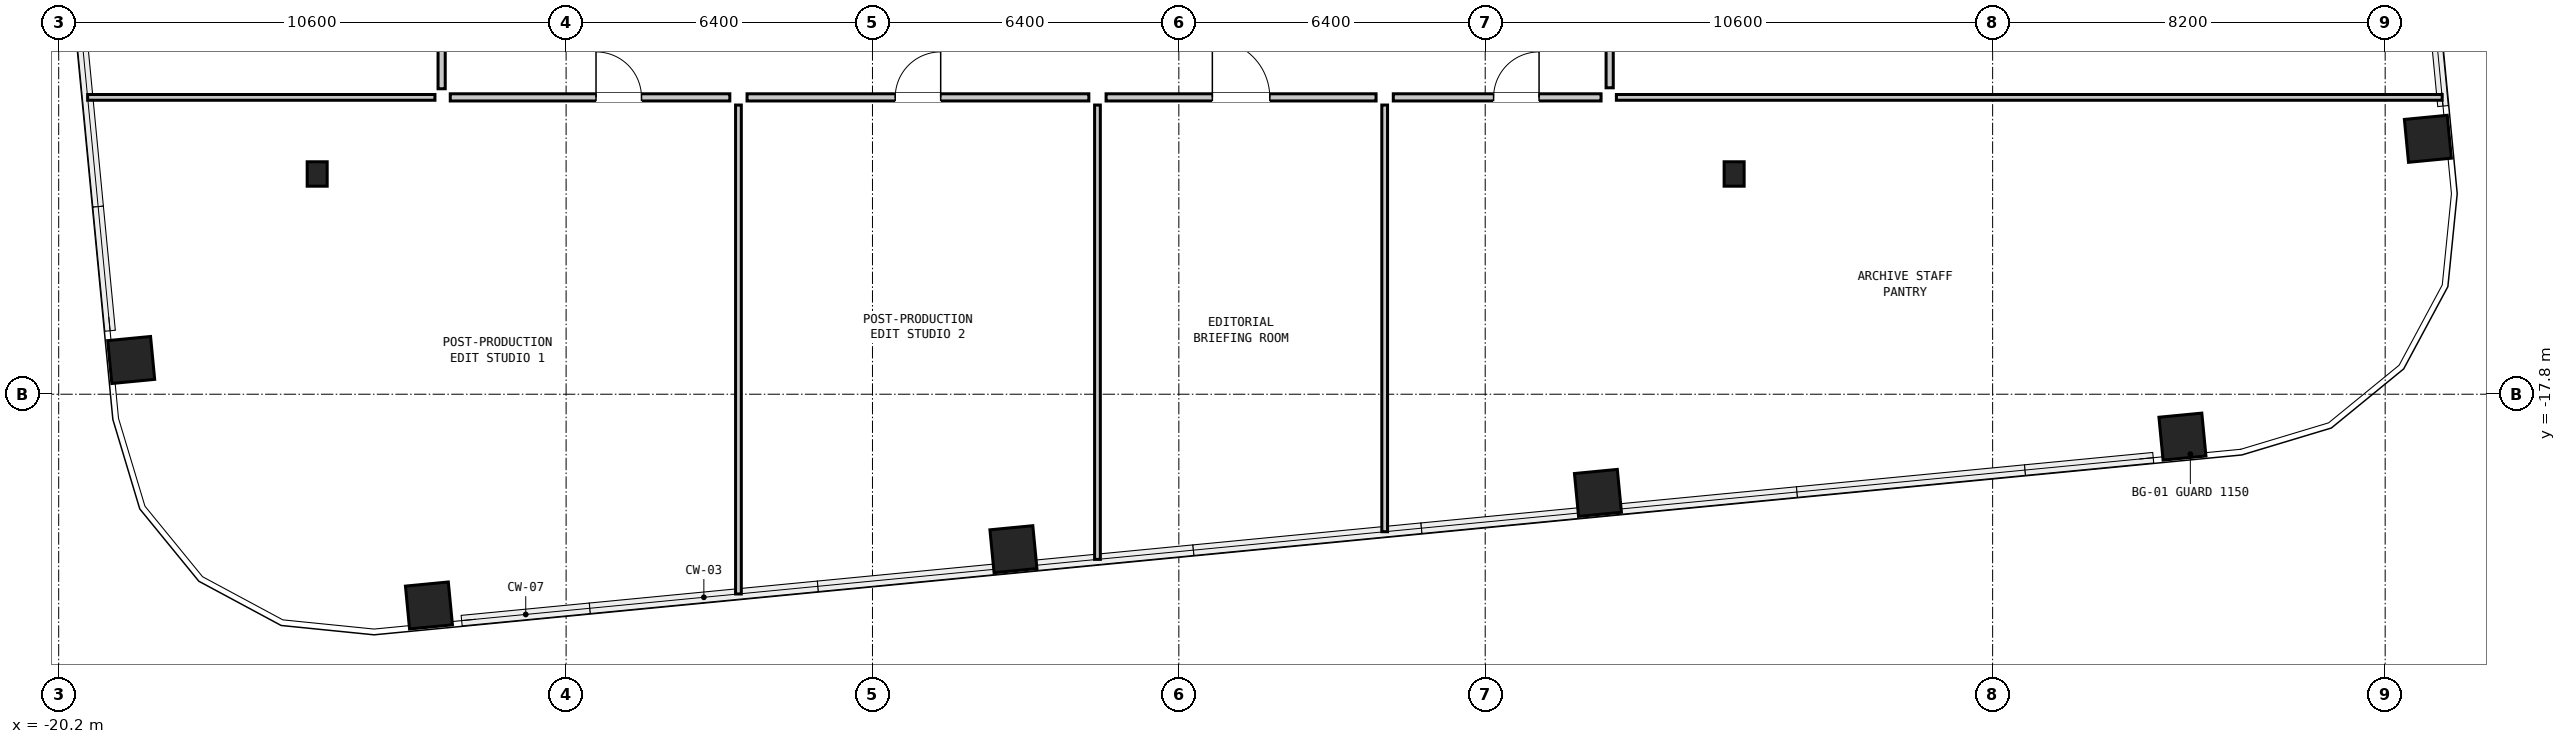
"""IFC4 building model, lengths in metres.
Left out: names, types, materials, properties, quantities, classifications, styles, units other than length and angle.
Written with IfcOpenShell. Run it as: python <this file> out.ifc"""

import sys

from ifc_helpers import new_model, si_unit, direction, frame, frame_2d, origin, origin_2d, place, context, subcontext, project, spatial, rectangle, hollow_rectangle, i_section, extrude, element, fill, save


model = new_model("IFC4")
c1 = context("Model", 3, precision=1e-05, world=origin(), true_north=direction((0.0, 1.0)))
c2 = subcontext(c1, "Body", "Model", "MODEL_VIEW")
j1 = project(units=[si_unit("LENGTHUNIT", "METRE"), si_unit("PLANEANGLEUNIT", "RADIAN")], contexts=[c1])
p1 = place(None, origin())
s1 = spatial("IfcSite", under=j1, at=p1, CompositionType="ELEMENT")
p2 = place(p1, origin())
s2 = spatial("IfcBuilding", under=s1, at=p2, CompositionType="ELEMENT")
p3 = place(p2, frame((0.0, 0.0, 87.75)))
s3 = spatial("IfcBuildingStorey", under=s2, at=p3, CompositionType="ELEMENT", Elevation=87.75)
for number, where, z_axis, x_axis in (
    (1, (-12.465, -22.213, 0.0), (0.0, 0.0, 1.0), (0.995, 0.096, 0.0)),
    (2, (-0.255, -21.037, 0.0), (0.0, 0.0, 1.0), (0.995, 0.096, 0.0)),
    (3, (11.955, -19.861, 0.0), (0.0, 0.0, 1.0), (0.995, 0.096, 0.0)),
    (4, (24.165, -18.686, 0.0), (0.0, 0.0, 1.0), (0.995, 0.096, 0.0)),
    (5, (29.292, -12.465, 0.0), (0.0, 0.0, 1.0), (-0.096, 0.995, 0.0)),
    (6, (-18.686, -17.085, 0.0), (0.0, 0.0, 1.0), (-0.096, 0.995, 0.0)),
):
    element("IfcColumn", number, at=place(p3, frame(where, z_axis=z_axis, x_axis=x_axis)), inside=s3, PredefinedType="COLUMN", context=c2, shape_type="SweptSolid", body=[
        extrude(hollow_rectangle(XDim=0.9, YDim=0.9, WallThickness=0.055, at=origin_2d()), origin(), (0.0, 0.0, 1.0), 3.05),
    ])
for number, where, z_axis, x_axis in (
    (7, (-14.8, -13.2, 0.0), (0.0, 0.0, 1.0), (1.0, 0.0, 0.0)),
    (8, (14.8, -13.2, 0.0), (0.0, 0.0, 1.0), (1.0, 0.0, 0.0)),
):
    element("IfcColumn", number, at=place(p3, frame(where, z_axis=z_axis, x_axis=x_axis)), inside=s3, PredefinedType="COLUMN", context=c2, shape_type="SweptSolid", body=[
        extrude(i_section(OverallWidth=0.418, OverallDepth=0.51, WebThickness=0.042, FlangeThickness=0.068, at=origin_2d()), origin(), (0.0, 0.0, 1.0), 3.05),
    ])
p4 = place(p3, frame((-19.595, -11.6, 0.0), z_axis=(0.0, 0.0, 1.0), x_axis=(1.0, 0.0, 0.0)))
e9 = element("IfcWall", 9, at=p4, inside=s3, PredefinedType="PARTITIONING", context=c2, shape_type="SweptSolid", body=[
    extrude(rectangle(XDim=7.255, YDim=0.12, at=frame_2d((3.628, 0.0))), origin(), (0.0, 0.0, 1.0), 2.274),
])
p5 = place(p3, frame((12.34, -11.6, 0.0), z_axis=(0.0, 0.0, 1.0), x_axis=(1.0, 0.0, 0.0)))
e10 = element("IfcWall", 10, at=p5, inside=s3, PredefinedType="PARTITIONING", context=c2, shape_type="SweptSolid", body=[
    extrude(rectangle(XDim=17.251, YDim=0.12, at=frame_2d((8.625, 0.0))), origin(), (0.0, 0.0, 1.0), 2.274),
])
p6 = place(p3, frame((-6.0, -21.972, 0.0), z_axis=(0.0, 0.0, 1.0), x_axis=(0.0, 1.0, 0.0)))
e11 = element("IfcWall", 11, at=p6, inside=s3, PredefinedType="PARTITIONING", context=c2, shape_type="SweptSolid", body=[
    extrude(rectangle(XDim=10.212, YDim=0.12, at=frame_2d((5.106, 0.0))), origin(), (0.0, 0.0, 1.0), 2.274),
])
p7 = place(p3, frame((1.5, -21.25, 0.0), z_axis=(0.0, 0.0, 1.0), x_axis=(0.0, 1.0, 0.0)))
e12 = element("IfcWall", 12, at=p7, inside=s3, PredefinedType="PARTITIONING", context=c2, shape_type="SweptSolid", body=[
    extrude(rectangle(XDim=9.49, YDim=0.12, at=frame_2d((4.745, 0.0))), origin(), (0.0, 0.0, 1.0), 2.83),
])
p8 = place(p3, frame((7.5, -20.672, 0.0), z_axis=(0.0, 0.0, 1.0), x_axis=(0.0, 1.0, 0.0)))
e13 = element("IfcWall", 13, at=p8, inside=s3, PredefinedType="PARTITIONING", context=c2, shape_type="SweptSolid", body=[
    extrude(rectangle(XDim=8.912, YDim=0.12, at=frame_2d((4.456, 0.0))), origin(), (0.0, 0.0, 1.0), 2.83),
])
p9 = place(p3, frame((-12.02, -11.6, 0.0), z_axis=(0.0, 0.0, 1.0), x_axis=(1.0, 0.0, 0.0)))
e14 = element("IfcWall", 14, at=p9, inside=s3, PredefinedType="PARTITIONING", context=c2, shape_type="SweptSolid", body=[
    extrude(rectangle(XDim=5.84, YDim=0.15, at=frame_2d((2.92, 0.0))), origin(), (0.0, 0.0, 1.0), 2.274),
])
p10 = place(p9, frame((3.045, 0.0, 0.0)))
e15 = element("IfcOpeningElement", 15, at=p10, cuts=e14, PredefinedType="OPENING", context=c2, shape_type="SweptSolid", body=[
    extrude(rectangle(XDim=0.95, YDim=2.1, at=frame_2d((0.475, 1.05))), frame((0.0, 0.087, 0.0), z_axis=(0.0, -1.0, 0.0), x_axis=(1.0, 0.0, 0.0)), (0.0, 0.0, 1.0), 0.174),
])
p11 = place(p3, frame((-5.82, -11.6, 0.0), z_axis=(0.0, 0.0, 1.0), x_axis=(1.0, 0.0, 0.0)))
e16 = element("IfcWall", 16, at=p11, inside=s3, PredefinedType="PARTITIONING", context=c2, shape_type="SweptSolid", body=[
    extrude(rectangle(XDim=7.14, YDim=0.15, at=frame_2d((3.57, 0.0))), origin(), (0.0, 0.0, 1.0), 2.83),
])
p12 = place(p11, frame((3.095, 0.0, 0.0)))
e17 = element("IfcOpeningElement", 17, at=p12, cuts=e16, PredefinedType="OPENING", context=c2, shape_type="SweptSolid", body=[
    extrude(rectangle(XDim=0.95, YDim=2.1, at=frame_2d((0.475, 1.05))), frame((0.0, 0.087, 0.0), z_axis=(0.0, -1.0, 0.0), x_axis=(1.0, 0.0, 0.0)), (0.0, 0.0, 1.0), 0.174),
])
p13 = place(p3, frame((1.68, -11.6, 0.0), z_axis=(0.0, 0.0, 1.0), x_axis=(1.0, 0.0, 0.0)))
e18 = element("IfcWall", 18, at=p13, inside=s3, PredefinedType="PARTITIONING", context=c2, shape_type="SweptSolid", body=[
    extrude(rectangle(XDim=5.64, YDim=0.15, at=frame_2d((2.82, 0.0))), origin(), (0.0, 0.0, 1.0), 2.83),
])
p14 = place(p13, frame((2.22, 0.0, 0.0)))
e19 = element("IfcOpeningElement", 19, at=p14, cuts=e18, PredefinedType="OPENING", context=c2, shape_type="SweptSolid", body=[
    extrude(rectangle(XDim=1.2, YDim=2.1, at=frame_2d((0.6, 1.05))), frame((0.0, 0.087, 0.0), z_axis=(0.0, -1.0, 0.0), x_axis=(1.0, 0.0, 0.0)), (0.0, 0.0, 1.0), 0.174),
])
p15 = place(p3, frame((7.68, -11.6, 0.0), z_axis=(0.0, 0.0, 1.0), x_axis=(1.0, 0.0, 0.0)))
e20 = element("IfcWall", 20, at=p15, inside=s3, PredefinedType="PARTITIONING", context=c2, shape_type="SweptSolid", body=[
    extrude(rectangle(XDim=4.34, YDim=0.15, at=frame_2d((2.17, 0.0))), origin(), (0.0, 0.0, 1.0), 2.274),
])
p16 = place(p15, frame((2.095, 0.0, 0.0)))
e21 = element("IfcOpeningElement", 21, at=p16, cuts=e20, PredefinedType="OPENING", context=c2, shape_type="SweptSolid", body=[
    extrude(rectangle(XDim=0.95, YDim=2.1, at=frame_2d((0.475, 1.05))), frame((0.0, 0.087, 0.0), z_axis=(0.0, -1.0, 0.0), x_axis=(1.0, 0.0, 0.0)), (0.0, 0.0, 1.0), 0.174),
])
p17 = place(p3, frame((-12.2, -11.42, 0.0), z_axis=(0.0, 0.0, 1.0), x_axis=(0.0, 1.0, 0.0)))
e22 = element("IfcWall", 22, at=p17, inside=s3, PredefinedType="PARTITIONING", context=c2, shape_type="SweptSolid", body=[
    extrude(rectangle(XDim=8.24, YDim=0.15, at=frame_2d((4.12, 0.0))), origin(), (0.0, 0.0, 1.0), 2.83),
])
p18 = place(p17, frame((3.645, 0.0, 0.0)))
e23 = element("IfcOpeningElement", 23, at=p18, cuts=e22, PredefinedType="OPENING", context=c2, shape_type="SweptSolid", body=[
    extrude(rectangle(XDim=0.95, YDim=2.1, at=frame_2d((0.475, 1.05))), frame((0.0, 0.087, 0.0), z_axis=(0.0, -1.0, 0.0), x_axis=(1.0, 0.0, 0.0)), (0.0, 0.0, 1.0), 0.174),
])
p19 = place(p3, frame((12.2, -11.4, 0.0), z_axis=(0.0, 0.0, 1.0), x_axis=(0.0, 1.0, 0.0)))
e24 = element("IfcWall", 24, at=p19, inside=s3, PredefinedType="PARTITIONING", context=c2, shape_type="SweptSolid", body=[
    extrude(rectangle(XDim=8.84, YDim=0.15, at=frame_2d((4.42, 0.0))), origin(), (0.0, 0.0, 1.0), 2.83),
])
p20 = place(p19, frame((3.945, 0.0, 0.0)))
e25 = element("IfcOpeningElement", 25, at=p20, cuts=e24, PredefinedType="OPENING", context=c2, shape_type="SweptSolid", body=[
    extrude(rectangle(XDim=0.95, YDim=2.1, at=frame_2d((0.475, 1.05))), frame((0.0, 0.087, 0.0), z_axis=(0.0, -1.0, 0.0), x_axis=(1.0, 0.0, 0.0)), (0.0, 0.0, 1.0), 0.174),
])
p21 = place(p10, origin())
e26 = element("IfcDoor", 26, at=p21, inside=s3, OperationType="SINGLE_SWING_LEFT", PredefinedType="DOOR", context=c2, shape_type="SweptSolid", body=[
    extrude(rectangle(XDim=0.95, YDim=2.1, at=frame_2d((0.475, 1.05))), frame((0.0, 0.025, 0.0), z_axis=(0.0, -1.0, 0.0), x_axis=(1.0, 0.0, 0.0)), (0.0, 0.0, 1.0), 0.05),
])
fill(e15, e26)
p22 = place(p12, origin())
e27 = element("IfcDoor", 27, at=p22, inside=s3, OperationType="SINGLE_SWING_RIGHT", PredefinedType="DOOR", context=c2, shape_type="SweptSolid", body=[
    extrude(rectangle(XDim=0.95, YDim=2.1, at=frame_2d((0.475, 1.05))), frame((0.0, 0.025, 0.0), z_axis=(0.0, -1.0, 0.0), x_axis=(1.0, 0.0, 0.0)), (0.0, 0.0, 1.0), 0.05),
])
fill(e17, e27)
p23 = place(p14, origin())
e28 = element("IfcDoor", 28, at=p23, inside=s3, OperationType="SINGLE_SWING_LEFT", PredefinedType="DOOR", context=c2, shape_type="SweptSolid", body=[
    extrude(rectangle(XDim=1.2, YDim=2.1, at=frame_2d((0.6, 1.05))), frame((0.0, 0.025, 0.0), z_axis=(0.0, -1.0, 0.0), x_axis=(1.0, 0.0, 0.0)), (0.0, 0.0, 1.0), 0.05),
])
fill(e19, e28)
p24 = place(p16, origin())
e29 = element("IfcDoor", 29, at=p24, inside=s3, OperationType="SINGLE_SWING_RIGHT", PredefinedType="DOOR", context=c2, shape_type="SweptSolid", body=[
    extrude(rectangle(XDim=0.95, YDim=2.1, at=frame_2d((0.475, 1.05))), frame((0.0, 0.025, 0.0), z_axis=(0.0, -1.0, 0.0), x_axis=(1.0, 0.0, 0.0)), (0.0, 0.0, 1.0), 0.05),
])
fill(e21, e29)
save(model, sys.argv[1])
